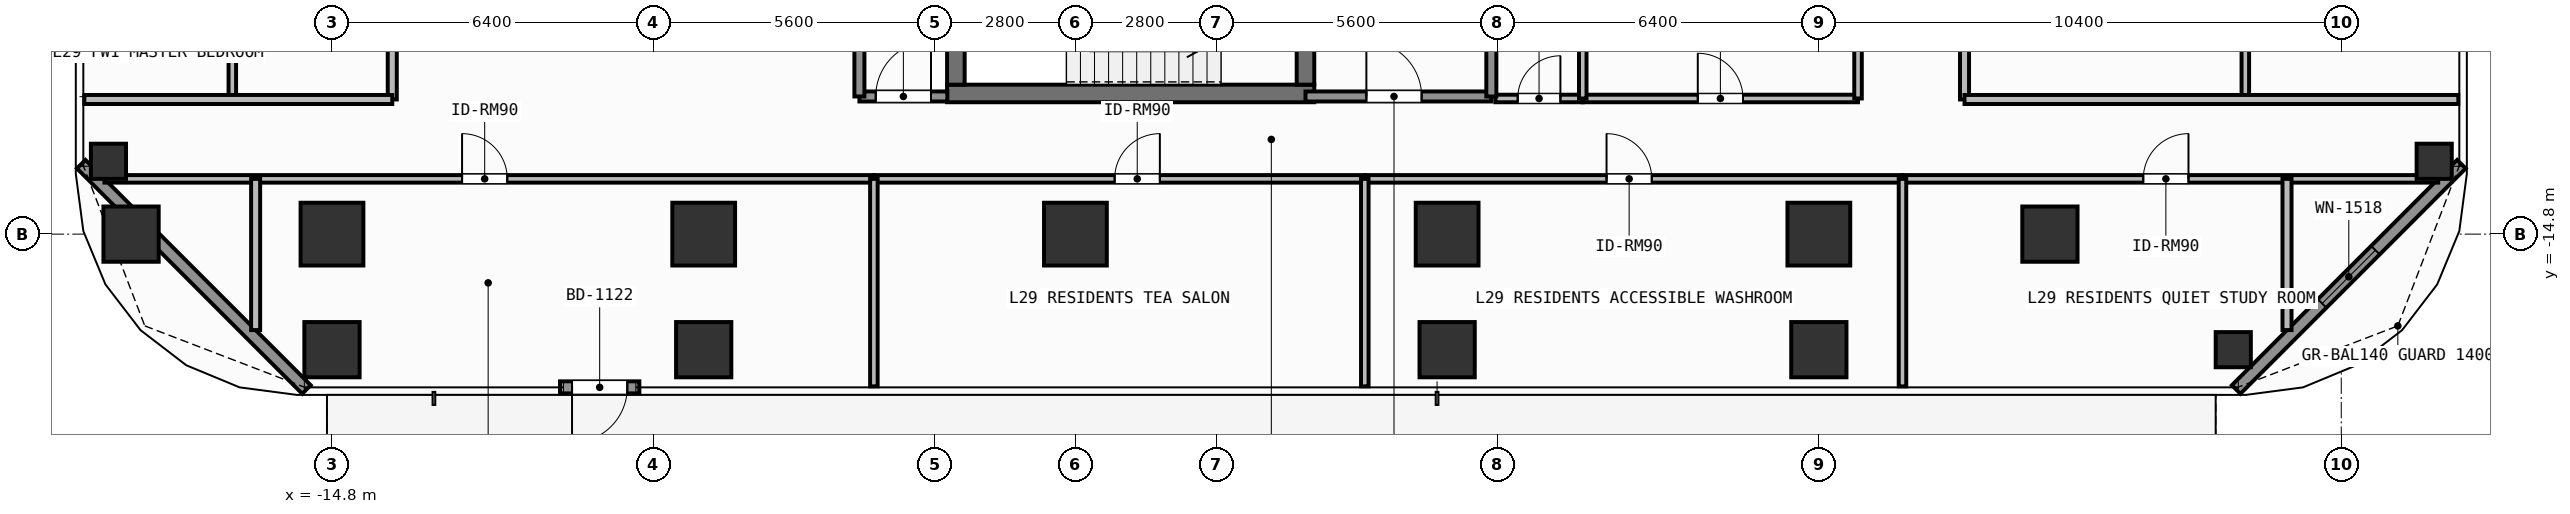
"""IFC4 building model, lengths in metres.
Left out: names, types, materials, properties, quantities, classifications, styles, units other than length and angle.
Written with IfcOpenShell. Run it as: python <this file> out.ifc"""

import sys

from ifc_helpers import new_model, si_unit, direction, frame, frame_2d, origin, origin_2d, place, context, subcontext, project, spatial, rectangle, hollow_rectangle, extrude, element, fill, save


model = new_model("IFC4")
c1 = context("Model", 3, precision=1e-05, world=origin(), true_north=direction((0.0, 1.0)))
c2 = subcontext(c1, "Body", "Model", "MODEL_VIEW")
j1 = project(units=[si_unit("LENGTHUNIT", "METRE"), si_unit("PLANEANGLEUNIT", "RADIAN")], contexts=[c1])
p1 = place(None, origin())
s1 = spatial("IfcSite", under=j1, at=p1, CompositionType="ELEMENT")
p2 = place(p1, origin())
s2 = spatial("IfcBuilding", under=s1, at=p2, CompositionType="ELEMENT")
p3 = place(p2, frame((0.0, 0.0, 117.3)))
s3 = spatial("IfcBuildingStorey", under=s2, at=p3, CompositionType="ELEMENT", Elevation=117.3)
p4 = place(p3, frame((-2.555, -12.0, 0.0), z_axis=(0.0, 0.0, 1.0), x_axis=(1.0, 0.0, 0.0)))
e1 = element("IfcWall", 1, at=p4, inside=s3, PredefinedType="SHEAR", context=c2, shape_type="SweptSolid", body=[
    extrude(rectangle(XDim=7.31, YDim=0.35, at=frame_2d((3.655, 0.0))), origin(), (0.0, 0.0, 1.0), 3.9),
])
p5 = place(p3, frame((-2.38, -11.825, 0.0), z_axis=(0.0, 0.0, 1.0), x_axis=(0.0, 1.0, 0.0)))
e2 = element("IfcWall", 2, at=p5, inside=s3, PredefinedType="SHEAR", context=c2, shape_type="SweptSolid", body=[
    extrude(rectangle(XDim=2.925, YDim=0.35, at=frame_2d((1.462, 0.0))), origin(), (0.0, 0.0, 1.0), 3.9),
])
p6 = place(p3, frame((4.58, -8.9, 0.0), z_axis=(0.0, 0.0, 1.0), x_axis=(0.0, -1.0, 0.0)))
e3 = element("IfcWall", 3, at=p6, inside=s3, PredefinedType="SHEAR", context=c2, shape_type="SweptSolid", body=[
    extrude(rectangle(XDim=2.925, YDim=0.35, at=frame_2d((1.462, 0.0))), origin(), (0.0, 0.0, 1.0), 3.9),
])
p7 = place(p6, frame((0.913, 0.0, 0.0)))
e4 = element("IfcOpeningElement", 4, at=p7, cuts=e3, PredefinedType="OPENING", context=c2, shape_type="SweptSolid", body=[
    extrude(rectangle(XDim=1.1, YDim=2.15, at=frame_2d((0.55, 1.075))), frame((0.0, 0.185, 0.0), z_axis=(0.0, -1.0, 0.0), x_axis=(1.0, 0.0, 0.0)), (0.0, 0.0, 1.0), 0.37),
])
for number, where, z_axis, x_axis in (
    (5, (-14.8, -14.8, 0.0), (0.0, 0.0, 1.0), (1.0, 0.0, 0.0)),
    (6, (-7.4, -14.8, 0.0), (0.0, 0.0, 1.0), (1.0, 0.0, 0.0)),
    (7, (0.0, -14.8, 0.0), (0.0, 0.0, 1.0), (1.0, 0.0, 0.0)),
    (8, (7.4, -14.8, 0.0), (0.0, 0.0, 1.0), (1.0, 0.0, 0.0)),
    (9, (14.8, -14.8, 0.0), (0.0, 0.0, 1.0), (1.0, 0.0, 0.0)),
):
    element("IfcColumn", number, at=place(p3, frame(where, z_axis=z_axis, x_axis=x_axis)), inside=s3, PredefinedType="COLUMN", context=c2, shape_type="SweptSolid", body=[
        extrude(rectangle(XDim=1.25, YDim=1.25, at=origin_2d()), origin(), (0.0, 0.0, 1.0), 3.9),
    ])
for number, where, z_axis, x_axis in (
    (10, (-18.8, -14.8, 0.0), (0.0, 0.0, 1.0), (1.0, 0.0, 0.0)),
    (11, (19.4, -14.8, 0.0), (0.0, 0.0, 1.0), (1.0, 0.0, 0.0)),
    (12, (-14.8, -17.1, 0.0), (0.0, 0.0, 1.0), (1.0, 0.0, 0.0)),
    (13, (-7.4, -17.1, 0.0), (0.0, 0.0, 1.0), (1.0, 0.0, 0.0)),
    (14, (7.4, -17.1, 0.0), (0.0, 0.0, 1.0), (1.0, 0.0, 0.0)),
    (15, (14.8, -17.1, 0.0), (0.0, 0.0, 1.0), (1.0, 0.0, 0.0)),
):
    element("IfcColumn", number, at=place(p3, frame(where, z_axis=z_axis, x_axis=x_axis)), inside=s3, PredefinedType="COLUMN", context=c2, shape_type="SweptSolid", body=[
        extrude(rectangle(XDim=1.1, YDim=1.1, at=origin_2d()), origin(), (0.0, 0.0, 1.0), 3.9),
    ])
for number, where, z_axis, x_axis in (
    (16, (23.05, -17.1, 0.0), (0.0, 0.0, 1.0), (1.0, 0.0, 0.0)),
    (17, (-19.25, -13.35, 0.0), (0.0, 0.0, 1.0), (1.0, 0.0, 0.0)),
    (18, (27.05, -13.35, 0.0), (0.0, 0.0, 1.0), (1.0, 0.0, 0.0)),
):
    element("IfcColumn", number, at=place(p3, frame(where, z_axis=z_axis, x_axis=x_axis)), inside=s3, PredefinedType="COLUMN", context=c2, shape_type="SweptSolid", body=[
        extrude(hollow_rectangle(XDim=0.7, YDim=0.7, WallThickness=0.032, at=origin_2d()), origin(), (0.0, 0.0, 1.0), 3.9),
    ])
p8 = place(p3, frame((-8.681, -17.85, 0.0), z_axis=(0.0, 0.0, 1.0), x_axis=(-1.0, 0.0, 0.0)))
e19 = element("IfcWall", 19, at=p8, inside=s3, PredefinedType="SOLIDWALL", context=c2, shape_type="SweptSolid", body=[
    extrude(rectangle(XDim=1.58, YDim=0.24, at=frame_2d((0.79, 0.0))), origin(), (0.0, 0.0, 1.0), 3.68),
])
p9 = place(p8, frame((0.24, 0.0, 0.0)))
e20 = element("IfcOpeningElement", 20, at=p9, cuts=e19, PredefinedType="OPENING", context=c2, shape_type="SweptSolid", body=[
    extrude(rectangle(XDim=1.1, YDim=2.2, at=frame_2d((0.55, 1.1))), frame((0.0, 0.13, 0.0), z_axis=(0.0, -1.0, 0.0), x_axis=(1.0, 0.0, 0.0)), (0.0, 0.0, 1.0), 0.26),
])
p10 = place(p3, frame((-15.308, -17.892, 0.0), z_axis=(0.0, 0.0, 1.0), x_axis=(-0.707126027686, 0.707087534163, 0.0)))
e21 = element("IfcWall", 21, at=p10, inside=s3, PredefinedType="SOLIDWALL", context=c2, shape_type="SweptSolid", body=[
    extrude(rectangle(XDim=6.342, YDim=0.24, at=frame_2d((3.171, 0.0))), origin(), (0.0, 0.0, 1.0), 3.68),
])
p11 = place(p3, frame((27.592, -13.408, 0.0), z_axis=(0.0, 0.0, 1.0), x_axis=(-0.707106781187, -0.707106781187, 0.0)))
e22 = element("IfcWall", 22, at=p11, inside=s3, PredefinedType="SOLIDWALL", context=c2, shape_type="SweptSolid", body=[
    extrude(rectangle(XDim=6.342, YDim=0.24, at=frame_2d((3.171, 0.0))), origin(), (0.0, 0.0, 1.0), 3.68),
])
p12 = place(p11, frame((2.421, 0.0, 0.8)))
e23 = element("IfcOpeningElement", 23, at=p12, cuts=e22, PredefinedType="OPENING", context=c2, shape_type="SweptSolid", body=[
    extrude(rectangle(XDim=1.5, YDim=1.85, at=frame_2d((0.75, 0.925))), frame((0.0, 0.13, 0.0), z_axis=(0.0, -1.0, 0.0), x_axis=(1.0, 0.0, 0.0)), (0.0, 0.0, 1.0), 0.26),
])
p13 = place(p3, frame((4.58, -12.06, 0.0), z_axis=(0.0, 0.0, 1.0), x_axis=(1.0, 0.0, 0.0)))
e24 = element("IfcWall", 24, at=p13, inside=s3, PredefinedType="SOLIDWALL", context=c2, shape_type="SweptSolid", body=[
    extrude(rectangle(XDim=3.7, YDim=0.2, at=frame_2d((1.85, 0.0))), origin(), (0.0, 0.0, 1.0), 3.68),
])
p14 = place(p13, frame((1.212, 0.0, 0.0)))
e25 = element("IfcOpeningElement", 25, at=p14, cuts=e24, PredefinedType="OPENING", context=c2, shape_type="SweptSolid", body=[
    extrude(rectangle(XDim=1.1, YDim=2.15, at=frame_2d((0.55, 1.075))), frame((0.0, 0.11, 0.0), z_axis=(0.0, -1.0, 0.0), x_axis=(1.0, 0.0, 0.0)), (0.0, 0.0, 1.0), 0.22),
])
p15 = place(p3, frame((-4.3, -12.06, 0.0), z_axis=(0.0, 0.0, 1.0), x_axis=(1.0, 0.0, 0.0)))
e26 = element("IfcWall", 26, at=p15, inside=s3, PredefinedType="SOLIDWALL", context=c2, shape_type="SweptSolid", body=[
    extrude(rectangle(XDim=1.75, YDim=0.2, at=frame_2d((0.875, 0.0))), origin(), (0.0, 0.0, 1.0), 3.68),
])
p16 = place(p15, frame((0.325, 0.0, 0.0)))
e27 = element("IfcOpeningElement", 27, at=p16, cuts=e26, PredefinedType="OPENING", context=c2, shape_type="SweptSolid", body=[
    extrude(rectangle(XDim=1.1, YDim=2.15, at=frame_2d((0.55, 1.075))), frame((0.0, 0.11, 0.0), z_axis=(0.0, -1.0, 0.0), x_axis=(1.0, 0.0, 0.0)), (0.0, 0.0, 1.0), 0.22),
])
p17 = place(p3, frame((8.36, -12.1, 0.0), z_axis=(0.0, 0.0, 1.0), x_axis=(1.0, 0.0, 0.0)))
e28 = element("IfcWall", 28, at=p17, inside=s3, PredefinedType="PARTITIONING", context=c2, shape_type="SweptSolid", body=[
    extrude(rectangle(XDim=1.74, YDim=0.15, at=frame_2d((0.87, 0.0))), origin(), (0.0, 0.0, 1.0), 3.68),
])
p18 = place(p17, frame((0.445, 0.0, 0.0)))
e29 = element("IfcOpeningElement", 29, at=p18, cuts=e28, PredefinedType="OPENING", context=c2, shape_type="SweptSolid", body=[
    extrude(rectangle(XDim=0.85, YDim=2.1, at=frame_2d((0.425, 1.05))), frame((0.0, 0.085, 0.0), z_axis=(0.0, -1.0, 0.0), x_axis=(1.0, 0.0, 0.0)), (0.0, 0.0, 1.0), 0.17),
])
p19 = place(p3, frame((10.1, -12.1, 0.0), z_axis=(0.0, 0.0, 1.0), x_axis=(1.0, 0.0, 0.0)))
e30 = element("IfcWall", 30, at=p19, inside=s3, PredefinedType="PARTITIONING", context=c2, shape_type="SweptSolid", body=[
    extrude(rectangle(XDim=5.48, YDim=0.15, at=frame_2d((2.74, 0.0))), origin(), (0.0, 0.0, 1.0), 3.68),
])
p20 = place(p19, frame((2.29, 0.0, 0.0)))
e31 = element("IfcOpeningElement", 31, at=p20, cuts=e30, PredefinedType="OPENING", context=c2, shape_type="SweptSolid", body=[
    extrude(rectangle(XDim=0.9, YDim=2.1, at=frame_2d((0.45, 1.05))), frame((0.0, 0.085, 0.0), z_axis=(0.0, -1.0, 0.0), x_axis=(1.0, 0.0, 0.0)), (0.0, 0.0, 1.0), 0.17),
])
p21 = place(p3, frame((-19.33, -13.7, 0.0), z_axis=(0.0, 0.0, 1.0), x_axis=(1.0, 0.0, 0.0)))
e32 = element("IfcWall", 32, at=p21, inside=s3, PredefinedType="PARTITIONING", context=c2, shape_type="SweptSolid", body=[
    extrude(rectangle(XDim=15.318, YDim=0.15, at=frame_2d((7.659, 0.0))), origin(), (0.0, 0.0, 1.0), 3.68),
])
p22 = place(p21, frame((7.12, 0.0, 0.0)))
e33 = element("IfcOpeningElement", 33, at=p22, cuts=e32, PredefinedType="OPENING", context=c2, shape_type="SweptSolid", body=[
    extrude(rectangle(XDim=0.9, YDim=2.1, at=frame_2d((0.45, 1.05))), frame((0.0, 0.085, 0.0), z_axis=(0.0, -1.0, 0.0), x_axis=(1.0, 0.0, 0.0)), (0.0, 0.0, 1.0), 0.17),
])
p23 = place(p3, frame((-4.012, -13.7, 0.0), z_axis=(0.0, 0.0, 1.0), x_axis=(1.0, 0.0, 0.0)))
e34 = element("IfcWall", 34, at=p23, inside=s3, PredefinedType="PARTITIONING", context=c2, shape_type="SweptSolid", body=[
    extrude(rectangle(XDim=9.773, YDim=0.15, at=frame_2d((4.886, 0.0))), origin(), (0.0, 0.0, 1.0), 3.68),
])
p24 = place(p23, frame((4.793, 0.0, 0.0)))
e35 = element("IfcOpeningElement", 35, at=p24, cuts=e34, PredefinedType="OPENING", context=c2, shape_type="SweptSolid", body=[
    extrude(rectangle(XDim=0.9, YDim=2.1, at=frame_2d((0.45, 1.05))), frame((0.0, 0.085, 0.0), z_axis=(0.0, -1.0, 0.0), x_axis=(1.0, 0.0, 0.0)), (0.0, 0.0, 1.0), 0.17),
])
p25 = place(p3, frame((5.761, -13.7, 0.0), z_axis=(0.0, 0.0, 1.0), x_axis=(1.0, 0.0, 0.0)))
e36 = element("IfcWall", 36, at=p25, inside=s3, PredefinedType="PARTITIONING", context=c2, shape_type="SweptSolid", body=[
    extrude(rectangle(XDim=10.704, YDim=0.15, at=frame_2d((5.352, 0.0))), origin(), (0.0, 0.0, 1.0), 3.68),
])
p26 = place(p25, frame((4.812, 0.0, 0.0)))
e37 = element("IfcOpeningElement", 37, at=p26, cuts=e36, PredefinedType="OPENING", context=c2, shape_type="SweptSolid", body=[
    extrude(rectangle(XDim=0.9, YDim=2.1, at=frame_2d((0.45, 1.05))), frame((0.0, 0.085, 0.0), z_axis=(0.0, -1.0, 0.0), x_axis=(1.0, 0.0, 0.0)), (0.0, 0.0, 1.0), 0.17),
])
p27 = place(p3, frame((16.465, -13.7, 0.0), z_axis=(0.0, 0.0, 1.0), x_axis=(1.0, 0.0, 0.0)))
e38 = element("IfcWall", 38, at=p27, inside=s3, PredefinedType="PARTITIONING", context=c2, shape_type="SweptSolid", body=[
    extrude(rectangle(XDim=10.665, YDim=0.15, at=frame_2d((5.333, 0.0))), origin(), (0.0, 0.0, 1.0), 3.68),
])
p28 = place(p27, frame((4.793, 0.0, 0.0)))
e39 = element("IfcOpeningElement", 39, at=p28, cuts=e38, PredefinedType="OPENING", context=c2, shape_type="SweptSolid", body=[
    extrude(rectangle(XDim=0.9, YDim=2.1, at=frame_2d((0.45, 1.05))), frame((0.0, 0.085, 0.0), z_axis=(0.0, -1.0, 0.0), x_axis=(1.0, 0.0, 0.0)), (0.0, 0.0, 1.0), 0.17),
])
p29 = place(p3, frame((-13.6, -12.12, 0.0), z_axis=(0.0, 0.0, 1.0), x_axis=(0.0, 1.0, 0.0)))
e40 = element("IfcWall", 40, at=p29, inside=s3, PredefinedType="PARTITIONING", context=c2, shape_type="SweptSolid", body=[
    extrude(rectangle(XDim=13.138, YDim=0.18, at=frame_2d((6.569, 0.0))), origin(), (0.0, 0.0, 1.0), 3.68),
])
p30 = place(p29, frame((5.711, 0.0, 0.0)))
e41 = element("IfcOpeningElement", 41, at=p30, cuts=e40, PredefinedType="OPENING", context=c2, shape_type="SweptSolid", body=[
    extrude(rectangle(XDim=1.0, YDim=2.2, at=frame_2d((0.5, 1.1))), frame((0.0, 0.1, 0.0), z_axis=(0.0, -1.0, 0.0), x_axis=(1.0, 0.0, 0.0)), (0.0, 0.0, 1.0), 0.2),
])
p31 = place(p3, frame((17.7, -12.12, 0.0), z_axis=(0.0, 0.0, 1.0), x_axis=(0.0, 1.0, 0.0)))
e42 = element("IfcWall", 42, at=p31, inside=s3, PredefinedType="PARTITIONING", context=c2, shape_type="SweptSolid", body=[
    extrude(rectangle(XDim=24.24, YDim=0.18, at=frame_2d((12.12, 0.0))), origin(), (0.0, 0.0, 1.0), 3.68),
])
p32 = place(p31, frame((11.62, 0.0, 0.0)))
e43 = element("IfcOpeningElement", 43, at=p32, cuts=e42, PredefinedType="OPENING", context=c2, shape_type="SweptSolid", body=[
    extrude(rectangle(XDim=1.0, YDim=2.2, at=frame_2d((0.5, 1.1))), frame((0.0, 0.1, 0.0), z_axis=(0.0, -1.0, 0.0), x_axis=(1.0, 0.0, 0.0)), (0.0, 0.0, 1.0), 0.2),
])
for number, where, z_axis, x_axis in (
    (44, (8.28, -12.06, 0.0), (0.0, 0.0, 1.0), (0.0, 1.0, 0.0)),
    (45, (-4.3, -12.06, 0.0), (0.0, 0.0, 1.0), (0.0, 1.0, 0.0)),
):
    element("IfcWall", number, at=place(p3, frame(where, z_axis=z_axis, x_axis=x_axis)), inside=s3, PredefinedType="SOLIDWALL", context=c2, shape_type="SweptSolid", body=[
        extrude(rectangle(XDim=3.185, YDim=0.2, at=frame_2d((1.593, 0.0))), origin(), (0.0, 0.0, 1.0), 3.68),
    ])
p33 = place(p3, frame((10.1, -12.1, 0.0), z_axis=(0.0, 0.0, 1.0), x_axis=(0.0, 1.0, 0.0)))
e46 = element("IfcWall", 46, at=p33, inside=s3, PredefinedType="PARTITIONING", context=c2, shape_type="SweptSolid", body=[
    extrude(rectangle(XDim=2.35, YDim=0.15, at=frame_2d((1.175, 0.0))), origin(), (0.0, 0.0, 1.0), 3.68),
])
p34 = place(p3, frame((15.58, -12.1, 0.0), z_axis=(0.0, 0.0, 1.0), x_axis=(0.0, 1.0, 0.0)))
e47 = element("IfcWall", 47, at=p34, inside=s3, PredefinedType="PARTITIONING", context=c2, shape_type="SweptSolid", body=[
    extrude(rectangle(XDim=6.25, YDim=0.15, at=frame_2d((3.125, 0.0))), origin(), (0.0, 0.0, 1.0), 3.68),
])
for number, where, z_axis, x_axis in (
    (48, (-16.32, -16.71, 0.0), (0.0, 0.0, 1.0), (0.0, 1.0, 0.0)),
    (49, (24.12, -16.71, 0.0), (0.0, 0.0, 1.0), (0.0, 1.0, 0.0)),
):
    element("IfcWall", number, at=place(p3, frame(where, z_axis=z_axis, x_axis=x_axis)), inside=s3, PredefinedType="PARTITIONING", context=c2, shape_type="SweptSolid", body=[
        extrude(rectangle(XDim=3.01, YDim=0.18, at=frame_2d((1.505, 0.0))), origin(), (0.0, 0.0, 1.0), 3.68),
    ])
for number, where, z_axis, x_axis in (
    (50, (-4.012, -17.83, 0.0), (0.0, 0.0, 1.0), (0.0, 1.0, 0.0)),
    (51, (5.761, -17.83, 0.0), (0.0, 0.0, 1.0), (0.0, 1.0, 0.0)),
    (52, (16.465, -17.83, 0.0), (0.0, 0.0, 1.0), (0.0, 1.0, 0.0)),
):
    element("IfcWall", number, at=place(p3, frame(where, z_axis=z_axis, x_axis=x_axis)), inside=s3, PredefinedType="PARTITIONING", context=c2, shape_type="SweptSolid", body=[
        extrude(rectangle(XDim=4.13, YDim=0.15, at=frame_2d((2.065, 0.0))), origin(), (0.0, 0.0, 1.0), 3.68),
    ])
p35 = place(p3, frame((-16.784, -12.12, 0.0), z_axis=(0.0, 0.0, 1.0), x_axis=(0.0, 1.0, 0.0)))
e53 = element("IfcWall", 53, at=p35, inside=s3, PredefinedType="PARTITIONING", context=c2, shape_type="SweptSolid", body=[
    extrude(rectangle(XDim=3.726, YDim=0.15, at=frame_2d((1.863, 0.0))), origin(), (0.0, 0.0, 1.0), 3.68),
])
p36 = place(p3, frame((-19.73, -12.12, 0.0), z_axis=(0.0, 0.0, 1.0), x_axis=(1.0, 0.0, 0.0)))
e54 = element("IfcWall", 54, at=p36, inside=s3, PredefinedType="PARTITIONING", context=c2, shape_type="SweptSolid", body=[
    extrude(rectangle(XDim=6.13, YDim=0.18, at=frame_2d((3.065, 0.0))), origin(), (0.0, 0.0, 1.0), 3.68),
])
p37 = place(p3, frame((23.29, -12.12, 0.0), z_axis=(0.0, 0.0, 1.0), x_axis=(0.0, 1.0, 0.0)))
e55 = element("IfcWall", 55, at=p37, inside=s3, PredefinedType="PARTITIONING", context=c2, shape_type="SweptSolid", body=[
    extrude(rectangle(XDim=6.684, YDim=0.15, at=frame_2d((3.342, 0.0))), origin(), (0.0, 0.0, 1.0), 3.68),
])
p38 = place(p3, frame((17.7, -12.12, 0.0), z_axis=(0.0, 0.0, 1.0), x_axis=(1.0, 0.0, 0.0)))
e56 = element("IfcWall", 56, at=p38, inside=s3, PredefinedType="PARTITIONING", context=c2, shape_type="SweptSolid", body=[
    extrude(rectangle(XDim=9.83, YDim=0.18, at=frame_2d((4.915, 0.0))), origin(), (0.0, 0.0, 1.0), 3.68),
])
p39 = place(p9, origin())
e57 = element("IfcDoor", 57, at=p39, inside=s3, OperationType="SINGLE_SWING_RIGHT", PredefinedType="DOOR", context=c2, shape_type="SweptSolid", body=[
    extrude(rectangle(XDim=1.1, YDim=2.2, at=frame_2d((0.55, 1.1))), frame((0.0, 0.025, 0.0), z_axis=(0.0, -1.0, 0.0), x_axis=(1.0, 0.0, 0.0)), (0.0, 0.0, 1.0), 0.05),
])
fill(e20, e57)
p40 = place(p12, origin())
e58 = element("IfcWindow", 58, at=p40, inside=s3, PartitioningType="SINGLE_PANEL", PredefinedType="WINDOW", context=c2, shape_type="SweptSolid", body=[
    extrude(rectangle(XDim=1.5, YDim=1.85, at=frame_2d((0.75, 0.925))), frame((0.0, 0.03, 0.0), z_axis=(0.0, -1.0, 0.0), x_axis=(1.0, 0.0, 0.0)), (0.0, 0.0, 1.0), 0.06),
])
fill(e23, e58)
p41 = place(p14, origin())
e59 = element("IfcDoor", 59, at=p41, inside=s3, OperationType="SINGLE_SWING_LEFT", PredefinedType="DOOR", context=c2, shape_type="SweptSolid", body=[
    extrude(rectangle(XDim=1.1, YDim=2.15, at=frame_2d((0.55, 1.075))), frame((0.0, 0.025, 0.0), z_axis=(0.0, -1.0, 0.0), x_axis=(1.0, 0.0, 0.0)), (0.0, 0.0, 1.0), 0.05),
])
fill(e25, e59)
p42 = place(p16, origin())
e60 = element("IfcDoor", 60, at=p42, inside=s3, OperationType="SINGLE_SWING_RIGHT", PredefinedType="DOOR", context=c2, shape_type="SweptSolid", body=[
    extrude(rectangle(XDim=1.1, YDim=2.15, at=frame_2d((0.55, 1.075))), frame((0.0, 0.025, 0.0), z_axis=(0.0, -1.0, 0.0), x_axis=(1.0, 0.0, 0.0)), (0.0, 0.0, 1.0), 0.05),
])
fill(e27, e60)
p43 = place(p18, origin())
e61 = element("IfcDoor", 61, at=p43, inside=s3, OperationType="SINGLE_SWING_RIGHT", PredefinedType="DOOR", context=c2, shape_type="SweptSolid", body=[
    extrude(rectangle(XDim=0.85, YDim=2.1, at=frame_2d((0.425, 1.05))), frame((0.0, 0.025, 0.0), z_axis=(0.0, -1.0, 0.0), x_axis=(1.0, 0.0, 0.0)), (0.0, 0.0, 1.0), 0.05),
])
fill(e29, e61)
p44 = place(p20, origin())
e62 = element("IfcDoor", 62, at=p44, inside=s3, OperationType="SINGLE_SWING_LEFT", PredefinedType="DOOR", context=c2, shape_type="SweptSolid", body=[
    extrude(rectangle(XDim=0.9, YDim=2.1, at=frame_2d((0.45, 1.05))), frame((0.0, 0.025, 0.0), z_axis=(0.0, -1.0, 0.0), x_axis=(1.0, 0.0, 0.0)), (0.0, 0.0, 1.0), 0.05),
])
fill(e31, e62)
p45 = place(p22, origin())
e63 = element("IfcDoor", 63, at=p45, inside=s3, OperationType="SINGLE_SWING_LEFT", PredefinedType="DOOR", context=c2, shape_type="SweptSolid", body=[
    extrude(rectangle(XDim=0.9, YDim=2.1, at=frame_2d((0.45, 1.05))), frame((0.0, 0.025, 0.0), z_axis=(0.0, -1.0, 0.0), x_axis=(1.0, 0.0, 0.0)), (0.0, 0.0, 1.0), 0.05),
])
fill(e33, e63)
p46 = place(p24, origin())
e64 = element("IfcDoor", 64, at=p46, inside=s3, OperationType="SINGLE_SWING_RIGHT", PredefinedType="DOOR", context=c2, shape_type="SweptSolid", body=[
    extrude(rectangle(XDim=0.9, YDim=2.1, at=frame_2d((0.45, 1.05))), frame((0.0, 0.025, 0.0), z_axis=(0.0, -1.0, 0.0), x_axis=(1.0, 0.0, 0.0)), (0.0, 0.0, 1.0), 0.05),
])
fill(e35, e64)
p47 = place(p26, origin())
e65 = element("IfcDoor", 65, at=p47, inside=s3, OperationType="SINGLE_SWING_LEFT", PredefinedType="DOOR", context=c2, shape_type="SweptSolid", body=[
    extrude(rectangle(XDim=0.9, YDim=2.1, at=frame_2d((0.45, 1.05))), frame((0.0, 0.025, 0.0), z_axis=(0.0, -1.0, 0.0), x_axis=(1.0, 0.0, 0.0)), (0.0, 0.0, 1.0), 0.05),
])
fill(e37, e65)
p48 = place(p28, origin())
e66 = element("IfcDoor", 66, at=p48, inside=s3, OperationType="SINGLE_SWING_RIGHT", PredefinedType="DOOR", context=c2, shape_type="SweptSolid", body=[
    extrude(rectangle(XDim=0.9, YDim=2.1, at=frame_2d((0.45, 1.05))), frame((0.0, 0.025, 0.0), z_axis=(0.0, -1.0, 0.0), x_axis=(1.0, 0.0, 0.0)), (0.0, 0.0, 1.0), 0.05),
])
fill(e39, e66)
save(model, sys.argv[1])
